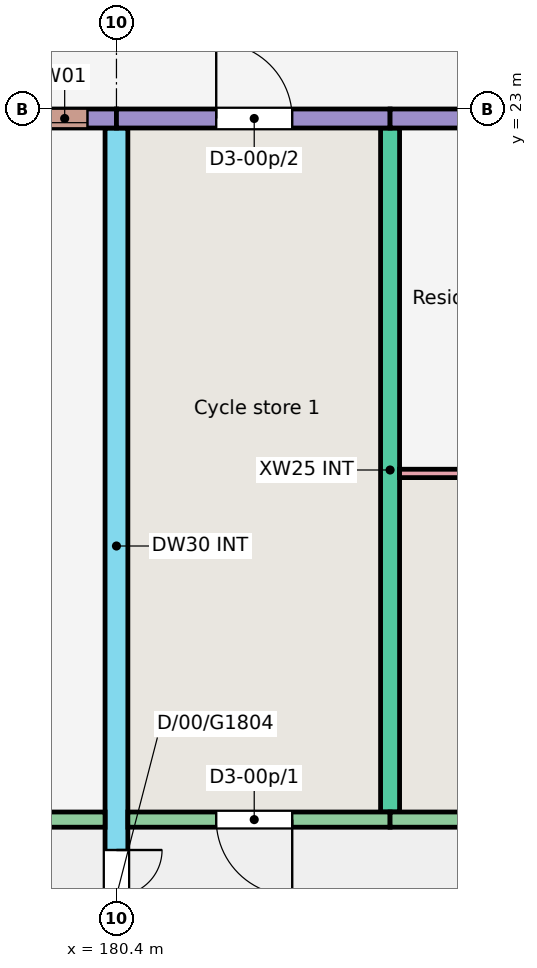
"""IFC4 building model, lengths in metres.
Left out: names, types, materials, properties, quantities, classifications, styles, units other than length and angle.
Written with IfcOpenShell. Run it as: python <this file> out.ifc"""

import sys

from ifc_helpers import new_model, si_unit, direction, frame, frame_2d, origin, place, context, subcontext, project, spatial, rectangle, extrude, element, fill, save


model = new_model("IFC4")
c1 = context("Model", 3, precision=1e-05, world=origin(), true_north=direction((0.0, 1.0)))
c2 = subcontext(c1, "Body", "Model", "MODEL_VIEW")
j1 = project(units=[si_unit("LENGTHUNIT", "METRE"), si_unit("PLANEANGLEUNIT", "RADIAN")], contexts=[c1])
p1 = place(None, origin())
s1 = spatial("IfcSite", under=j1, at=p1, CompositionType="ELEMENT")
p2 = place(p1, origin())
s2 = spatial("IfcBuilding", under=s1, at=p2, CompositionType="ELEMENT")
p3 = place(p2, origin())
s3 = spatial("IfcBuildingStorey", under=s2, at=p3, CompositionType="ELEMENT", Elevation=0.0)
p4 = place(p3, frame((180.4, 11.75, -0.25), z_axis=(0.0, 0.0, 1.0), x_axis=(0.0, 1.0, 0.0)))
e1 = element("IfcWall", 1, at=p4, inside=s3, PredefinedType="SHEAR", context=c2, shape_type="SweptSolid", body=[
    extrude(rectangle(XDim=11.0, YDim=0.3, at=frame_2d((5.5, 0.0))), origin(), (0.0, 0.0, 1.0), 3.25),
])
p5 = place(p4, frame((0.3, 0.0, 0.25)))
e2 = element("IfcOpeningElement", 2, at=p5, cuts=e1, PredefinedType="OPENING", context=c2, shape_type="SweptSolid", body=[
    extrude(rectangle(XDim=1.2, YDim=2.1, at=frame_2d((0.6, 1.05))), frame((0.0, 0.16, 0.0), z_axis=(0.0, -1.0, 0.0), x_axis=(1.0, 0.0, 0.0)), (0.0, 0.0, 1.0), 0.32),
])
p6 = place(p3, frame((184.0, 13.75, -0.25), z_axis=(0.0, 0.0, 1.0), x_axis=(0.0, 1.0, 0.0)))
e3 = element("IfcWall", 3, at=p6, inside=s3, PredefinedType="SHEAR", context=c2, shape_type="SweptSolid", body=[
    extrude(rectangle(XDim=9.0, YDim=0.25, at=frame_2d((4.5, 0.0))), origin(), (0.0, 0.0, 1.0), 3.25),
])
p7 = place(p3, frame((176.8, 22.875, -0.25), z_axis=(0.0, 0.0, 1.0), x_axis=(1.0, 0.0, 0.0)))
e4 = element("IfcWall", 4, at=p7, inside=s3, PredefinedType="SOLIDWALL", context=c2, shape_type="SweptSolid", body=[
    extrude(rectangle(XDim=3.6, YDim=0.25, at=frame_2d((1.8, 0.0))), origin(), (0.0, 0.0, 1.0), 3.25),
])
p8 = place(p7, frame((2.619, 0.0, 2.05)))
e5 = element("IfcOpeningElement", 5, at=p8, cuts=e4, PredefinedType="OPENING", context=c2, shape_type="SweptSolid", body=[
    extrude(rectangle(XDim=0.6, YDim=0.6, at=frame_2d((0.3, 0.3))), frame((0.0, 0.135, 0.0), z_axis=(0.0, -1.0, 0.0), x_axis=(1.0, 0.0, 0.0)), (0.0, 0.0, 1.0), 0.27),
])
p9 = place(p7, frame((1.288, 0.0, 0.25)))
e6 = element("IfcOpeningElement", 6, at=p9, cuts=e4, PredefinedType="OPENING", context=c2, shape_type="SweptSolid", body=[
    extrude(rectangle(XDim=1.0, YDim=2.1, at=frame_2d((0.5, 1.05))), frame((0.0, 0.135, 0.0), z_axis=(0.0, -1.0, 0.0), x_axis=(1.0, 0.0, 0.0)), (0.0, 0.0, 1.0), 0.27),
])
p10 = place(p3, frame((176.8, 13.65, -0.25), z_axis=(0.0, 0.0, 1.0), x_axis=(1.0, 0.0, 0.0)))
e7 = element("IfcWall", 7, at=p10, inside=s3, PredefinedType="SOLIDWALL", context=c2, shape_type="SweptSolid", body=[
    extrude(rectangle(XDim=3.45, YDim=0.2, at=frame_2d((1.725, 0.0))), origin(), (0.0, 0.0, 1.0), 3.25),
])
p11 = place(p10, frame((1.288, 0.0, 0.25)))
e8 = element("IfcOpeningElement", 8, at=p11, cuts=e7, PredefinedType="OPENING", context=c2, shape_type="SweptSolid", body=[
    extrude(rectangle(XDim=1.0, YDim=2.1, at=frame_2d((0.5, 1.05))), frame((0.0, 0.11, 0.0), z_axis=(0.0, -1.0, 0.0), x_axis=(1.0, 0.0, 0.0)), (0.0, 0.0, 1.0), 0.22),
])
p12 = place(p3, frame((180.4, 22.875, -0.25), z_axis=(0.0, 0.0, 1.0), x_axis=(1.0, 0.0, 0.0)))
e9 = element("IfcWall", 9, at=p12, inside=s3, PredefinedType="SOLIDWALL", context=c2, shape_type="SweptSolid", body=[
    extrude(rectangle(XDim=3.6, YDim=0.25, at=frame_2d((1.8, 0.0))), origin(), (0.0, 0.0, 1.0), 3.25),
])
p13 = place(p12, frame((1.312, 0.0, 0.25)))
e10 = element("IfcOpeningElement", 10, at=p13, cuts=e9, PredefinedType="OPENING", context=c2, shape_type="SweptSolid", body=[
    extrude(rectangle(XDim=1.0, YDim=2.1, at=frame_2d((0.5, 1.05))), frame((0.0, 0.135, 0.0), z_axis=(0.0, -1.0, 0.0), x_axis=(1.0, 0.0, 0.0)), (0.0, 0.0, 1.0), 0.27),
])
p14 = place(p3, frame((180.55, 13.65, -0.25), z_axis=(0.0, 0.0, 1.0), x_axis=(1.0, 0.0, 0.0)))
e11 = element("IfcWall", 11, at=p14, inside=s3, PredefinedType="SOLIDWALL", context=c2, shape_type="SweptSolid", body=[
    extrude(rectangle(XDim=3.45, YDim=0.2, at=frame_2d((1.725, 0.0))), origin(), (0.0, 0.0, 1.0), 3.25),
])
p15 = place(p14, frame((1.163, 0.0, 0.25)))
e12 = element("IfcOpeningElement", 12, at=p15, cuts=e11, PredefinedType="OPENING", context=c2, shape_type="SweptSolid", body=[
    extrude(rectangle(XDim=1.0, YDim=2.1, at=frame_2d((0.5, 1.05))), frame((0.0, 0.11, 0.0), z_axis=(0.0, -1.0, 0.0), x_axis=(1.0, 0.0, 0.0)), (0.0, 0.0, 1.0), 0.22),
])
p16 = place(p3, frame((184.0, 22.875, -0.25), z_axis=(0.0, 0.0, 1.0), x_axis=(1.0, 0.0, 0.0)))
e13 = element("IfcWall", 13, at=p16, inside=s3, PredefinedType="SOLIDWALL", context=c2, shape_type="SweptSolid", body=[
    extrude(rectangle(XDim=3.6, YDim=0.25, at=frame_2d((1.8, 0.0))), origin(), (0.0, 0.0, 1.0), 3.25),
])
p17 = place(p16, frame((1.3, 0.0, 0.25)))
e14 = element("IfcOpeningElement", 14, at=p17, cuts=e13, PredefinedType="OPENING", context=c2, shape_type="SweptSolid", body=[
    extrude(rectangle(XDim=1.0, YDim=2.1, at=frame_2d((0.5, 1.05))), frame((0.0, 0.135, 0.0), z_axis=(0.0, -1.0, 0.0), x_axis=(1.0, 0.0, 0.0)), (0.0, 0.0, 1.0), 0.27),
])
p18 = place(p3, frame((184.0, 13.65, -0.25), z_axis=(0.0, 0.0, 1.0), x_axis=(1.0, 0.0, 0.0)))
e15 = element("IfcWall", 15, at=p18, inside=s3, PredefinedType="SOLIDWALL", context=c2, shape_type="SweptSolid", body=[
    extrude(rectangle(XDim=3.6, YDim=0.2, at=frame_2d((1.8, 0.0))), origin(), (0.0, 0.0, 1.0), 3.25),
])
p19 = place(p18, frame((1.3, 0.0, 0.25)))
e16 = element("IfcOpeningElement", 16, at=p19, cuts=e15, PredefinedType="OPENING", context=c2, shape_type="SweptSolid", body=[
    extrude(rectangle(XDim=1.0, YDim=2.1, at=frame_2d((0.5, 1.05))), frame((0.0, 0.11, 0.0), z_axis=(0.0, -1.0, 0.0), x_axis=(1.0, 0.0, 0.0)), (0.0, 0.0, 1.0), 0.22),
])
p20 = place(p3, frame((184.125, 18.205, 0.0), z_axis=(0.0, 0.0, 1.0), x_axis=(1.0, 0.0, 0.0)))
e17 = element("IfcWall", 17, at=p20, inside=s3, PredefinedType="PARTITIONING", context=c2, shape_type="SweptSolid", body=[
    extrude(rectangle(XDim=3.35, YDim=0.11, at=frame_2d((1.675, 0.0))), origin(), (0.0, 0.0, 1.0), 2.8),
])
p21 = place(p8, origin())
e18 = element("IfcWindow", 18, at=p21, inside=s3, PartitioningType="SINGLE_PANEL", PredefinedType="WINDOW", context=c2, shape_type="SweptSolid", body=[
    extrude(rectangle(XDim=0.6, YDim=0.6, at=frame_2d((0.3, 0.3))), frame((0.0, -0.025, 0.0), z_axis=(0.0, -1.0, 0.0), x_axis=(1.0, 0.0, 0.0)), (0.0, 0.0, 1.0), 0.06),
])
fill(e5, e18)
p22 = place(p15, origin())
e19 = element("IfcDoor", 19, at=p22, inside=s3, OperationType="SINGLE_SWING_RIGHT", PredefinedType="DOOR", context=c2, shape_type="SweptSolid", body=[
    extrude(rectangle(XDim=1.0, YDim=2.1, at=frame_2d((0.5, 1.05))), frame((0.0, 0.025, 0.0), z_axis=(0.0, -1.0, 0.0), x_axis=(1.0, 0.0, 0.0)), (0.0, 0.0, 1.0), 0.05),
])
fill(e12, e19)
p23 = place(p13, origin())
e20 = element("IfcDoor", 20, at=p23, inside=s3, OperationType="SINGLE_SWING_LEFT", PredefinedType="DOOR", context=c2, shape_type="SweptSolid", body=[
    extrude(rectangle(XDim=1.0, YDim=2.1, at=frame_2d((0.5, 1.05))), frame((0.0, 0.025, 0.0), z_axis=(0.0, -1.0, 0.0), x_axis=(1.0, 0.0, 0.0)), (0.0, 0.0, 1.0), 0.05),
])
fill(e10, e20)
p24 = place(p5, origin())
e21 = element("IfcDoor", 21, at=p24, inside=s3, OperationType="DOUBLE_DOOR_SINGLE_SWING", PredefinedType="DOOR", context=c2, shape_type="SweptSolid", body=[
    extrude(rectangle(XDim=1.2, YDim=2.1, at=frame_2d((0.6, 1.05))), frame((0.0, 0.025, 0.0), z_axis=(0.0, -1.0, 0.0), x_axis=(1.0, 0.0, 0.0)), (0.0, 0.0, 1.0), 0.05),
])
fill(e2, e21)
save(model, sys.argv[1])
